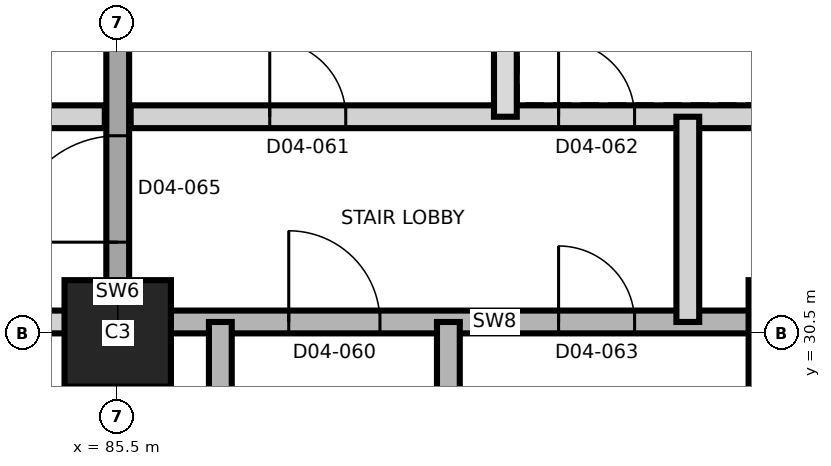
"""IFC4 building model, lengths in metres.
Left out: names, types, materials, properties, quantities, classifications, styles, units other than length and angle.
Written with IfcOpenShell. Run it as: python <this file> out.ifc"""

import sys

from ifc_helpers import new_model, si_unit, direction, frame, frame_2d, origin, origin_2d, place, context, subcontext, project, spatial, rectangle, extrude, element, fill, save


model = new_model("IFC4")
c1 = context("Model", 3, precision=1e-05, world=origin(), true_north=direction((0.0, 1.0)))
c2 = subcontext(c1, "Body", "Model", "MODEL_VIEW")
j1 = project(units=[si_unit("LENGTHUNIT", "METRE"), si_unit("PLANEANGLEUNIT", "RADIAN")], contexts=[c1])
p1 = place(None, origin())
s1 = spatial("IfcSite", under=j1, at=p1, CompositionType="ELEMENT")
p2 = place(p1, origin())
s2 = spatial("IfcBuilding", under=s1, at=p2, CompositionType="ELEMENT")
p3 = place(p2, frame((0.0, 0.0, 66.8)))
s3 = spatial("IfcBuildingStorey", under=s2, at=p3, CompositionType="ELEMENT", Elevation=66.8)
for number, where, z_axis, x_axis in (
    (1, (85.5, 30.5, 0.0), (0.0, 0.0, 1.0), (1.0, 0.0, 0.0)),
    (2, (94.5, 30.5, 0.0), (0.0, 0.0, 1.0), (1.0, 0.0, 0.0)),
):
    element("IfcColumn", number, at=place(p3, frame(where, z_axis=z_axis, x_axis=x_axis)), inside=s3, PredefinedType="COLUMN", context=c2, shape_type="SweptSolid", body=[
        extrude(rectangle(XDim=1.4, YDim=1.4, at=origin_2d()), origin(), (0.0, 0.0, 1.0), 3.7),
    ])
p4 = place(p3, frame((85.5, 19.17, 0.0), z_axis=(0.0, 0.0, 1.0), x_axis=(0.0, 1.0, 0.0)))
e3 = element("IfcWall", 3, at=p4, inside=s3, PredefinedType="SHEAR", context=c2, shape_type="SweptSolid", body=[
    extrude(rectangle(XDim=22.66, YDim=0.3, at=frame_2d((11.33, 0.0))), origin(), (0.0, 0.0, 1.0), 3.7),
])
p5 = place(p4, frame((12.53, 0.0, 0.0)))
e4 = element("IfcOpeningElement", 4, at=p5, cuts=e3, PredefinedType="OPENING", context=c2, shape_type="SweptSolid", body=[
    extrude(rectangle(XDim=1.4, YDim=2.1, at=frame_2d((0.7, 1.05))), frame((0.0, 0.16, 0.0), z_axis=(0.0, -1.0, 0.0), x_axis=(1.0, 0.0, 0.0)), (0.0, 0.0, 1.0), 0.32),
])
p6 = place(p3, frame((58.95, 30.65, 0.0), z_axis=(0.0, 0.0, 1.0), x_axis=(1.0, 0.0, 0.0)))
e5 = element("IfcWall", 5, at=p6, inside=s3, PredefinedType="PARTITIONING", context=c2, shape_type="SweptSolid", body=[
    extrude(rectangle(XDim=26.38, YDim=0.3, at=frame_2d((13.19, 0.0))), origin(), (0.0, 0.0, 1.0), 3.4),
])
p7 = place(p6, frame((1.25, 0.0, 0.0)))
e6 = element("IfcOpeningElement", 6, at=p7, cuts=e5, PredefinedType="OPENING", context=c2, shape_type="SweptSolid", body=[
    extrude(rectangle(XDim=1.2, YDim=2.1, at=frame_2d((0.6, 1.05))), frame((0.0, 0.16, 0.0), z_axis=(0.0, -1.0, 0.0), x_axis=(1.0, 0.0, 0.0)), (0.0, 0.0, 1.0), 0.32),
])
p8 = place(p6, frame((4.5, 0.0, 0.0)))
e7 = element("IfcOpeningElement", 7, at=p8, cuts=e5, PredefinedType="OPENING", context=c2, shape_type="SweptSolid", body=[
    extrude(rectangle(XDim=1.0, YDim=2.1, at=frame_2d((0.5, 1.05))), frame((0.0, 0.16, 0.0), z_axis=(0.0, -1.0, 0.0), x_axis=(1.0, 0.0, 0.0)), (0.0, 0.0, 1.0), 0.32),
])
p9 = place(p6, frame((14.2, 0.0, 0.0)))
e8 = element("IfcOpeningElement", 8, at=p9, cuts=e5, PredefinedType="OPENING", context=c2, shape_type="SweptSolid", body=[
    extrude(rectangle(XDim=1.0, YDim=2.4, at=frame_2d((0.5, 1.2))), frame((0.0, 0.16, 0.0), z_axis=(0.0, -1.0, 0.0), x_axis=(1.0, 0.0, 0.0)), (0.0, 0.0, 1.0), 0.32),
])
p10 = place(p6, frame((18.685, 0.0, 0.0)))
e9 = element("IfcOpeningElement", 9, at=p10, cuts=e5, PredefinedType="OPENING", context=c2, shape_type="SweptSolid", body=[
    extrude(rectangle(XDim=1.2, YDim=2.1, at=frame_2d((0.6, 1.05))), frame((0.0, 0.16, 0.0), z_axis=(0.0, -1.0, 0.0), x_axis=(1.0, 0.0, 0.0)), (0.0, 0.0, 1.0), 0.32),
])
p11 = place(p6, frame((21.935, 0.0, 0.0)))
e10 = element("IfcOpeningElement", 10, at=p11, cuts=e5, PredefinedType="OPENING", context=c2, shape_type="SweptSolid", body=[
    extrude(rectangle(XDim=1.0, YDim=2.1, at=frame_2d((0.5, 1.05))), frame((0.0, 0.16, 0.0), z_axis=(0.0, -1.0, 0.0), x_axis=(1.0, 0.0, 0.0)), (0.0, 0.0, 1.0), 0.32),
])
p12 = place(p3, frame((85.67, 30.65, 0.0), z_axis=(0.0, 0.0, 1.0), x_axis=(1.0, 0.0, 0.0)))
e11 = element("IfcWall", 11, at=p12, inside=s3, PredefinedType="SHEAR", context=c2, shape_type="SweptSolid", body=[
    extrude(rectangle(XDim=9.58, YDim=0.3, at=frame_2d((4.79, 0.0))), origin(), (0.0, 0.0, 1.0), 3.4),
])
p13 = place(p12, frame((2.08, 0.0, 0.0)))
e12 = element("IfcOpeningElement", 12, at=p13, cuts=e11, PredefinedType="OPENING", context=c2, shape_type="SweptSolid", body=[
    extrude(rectangle(XDim=1.2, YDim=2.1, at=frame_2d((0.6, 1.05))), frame((0.0, 0.16, 0.0), z_axis=(0.0, -1.0, 0.0), x_axis=(1.0, 0.0, 0.0)), (0.0, 0.0, 1.0), 0.32),
])
p14 = place(p12, frame((5.63, 0.0, 0.0)))
e13 = element("IfcOpeningElement", 13, at=p14, cuts=e11, PredefinedType="OPENING", context=c2, shape_type="SweptSolid", body=[
    extrude(rectangle(XDim=1.0, YDim=2.1, at=frame_2d((0.5, 1.05))), frame((0.0, 0.16, 0.0), z_axis=(0.0, -1.0, 0.0), x_axis=(1.0, 0.0, 0.0)), (0.0, 0.0, 1.0), 0.32),
])
p15 = place(p3, frame((58.95, 33.35, 0.0), z_axis=(0.0, 0.0, 1.0), x_axis=(1.0, 0.0, 0.0)))
e14 = element("IfcWall", 14, at=p15, inside=s3, PredefinedType="PARTITIONING", context=c2, shape_type="SweptSolid", body=[
    extrude(rectangle(XDim=26.38, YDim=0.3, at=frame_2d((13.19, 0.0))), origin(), (0.0, 0.0, 1.0), 3.4),
])
p16 = place(p15, frame((1.9, 0.0, 0.0)))
e15 = element("IfcOpeningElement", 15, at=p16, cuts=e14, PredefinedType="OPENING", context=c2, shape_type="SweptSolid", body=[
    extrude(rectangle(XDim=1.0, YDim=2.4, at=frame_2d((0.5, 1.2))), frame((0.0, 0.16, 0.0), z_axis=(0.0, -1.0, 0.0), x_axis=(1.0, 0.0, 0.0)), (0.0, 0.0, 1.0), 0.32),
])
p17 = place(p15, frame((9.685, 0.0, 0.0)))
e16 = element("IfcOpeningElement", 16, at=p17, cuts=e14, PredefinedType="OPENING", context=c2, shape_type="SweptSolid", body=[
    extrude(rectangle(XDim=1.2, YDim=2.1, at=frame_2d((0.6, 1.05))), frame((0.0, 0.16, 0.0), z_axis=(0.0, -1.0, 0.0), x_axis=(1.0, 0.0, 0.0)), (0.0, 0.0, 1.0), 0.32),
])
p18 = place(p15, frame((12.935, 0.0, 0.0)))
e17 = element("IfcOpeningElement", 17, at=p18, cuts=e14, PredefinedType="OPENING", context=c2, shape_type="SweptSolid", body=[
    extrude(rectangle(XDim=1.0, YDim=2.1, at=frame_2d((0.5, 1.05))), frame((0.0, 0.16, 0.0), z_axis=(0.0, -1.0, 0.0), x_axis=(1.0, 0.0, 0.0)), (0.0, 0.0, 1.0), 0.32),
])
p19 = place(p15, frame((18.7, 0.0, 0.0)))
e18 = element("IfcOpeningElement", 18, at=p19, cuts=e14, PredefinedType="OPENING", context=c2, shape_type="SweptSolid", body=[
    extrude(rectangle(XDim=1.0, YDim=2.1, at=frame_2d((0.5, 1.05))), frame((0.0, 0.16, 0.0), z_axis=(0.0, -1.0, 0.0), x_axis=(1.0, 0.0, 0.0)), (0.0, 0.0, 1.0), 0.32),
])
p20 = place(p15, frame((24.55, 0.0, 0.0)))
e19 = element("IfcOpeningElement", 19, at=p20, cuts=e14, PredefinedType="OPENING", context=c2, shape_type="SweptSolid", body=[
    extrude(rectangle(XDim=1.0, YDim=2.1, at=frame_2d((0.5, 1.05))), frame((0.0, 0.16, 0.0), z_axis=(0.0, -1.0, 0.0), x_axis=(1.0, 0.0, 0.0)), (0.0, 0.0, 1.0), 0.32),
])
p21 = place(p3, frame((85.67, 33.35, 0.0), z_axis=(0.0, 0.0, 1.0), x_axis=(1.0, 0.0, 0.0)))
e20 = element("IfcWall", 20, at=p21, inside=s3, PredefinedType="PARTITIONING", context=c2, shape_type="SweptSolid", body=[
    extrude(rectangle(XDim=9.58, YDim=0.3, at=frame_2d((4.79, 0.0))), origin(), (0.0, 0.0, 1.0), 3.4),
])
p22 = place(p21, frame((1.83, 0.0, 0.0)))
e21 = element("IfcOpeningElement", 21, at=p22, cuts=e20, PredefinedType="OPENING", context=c2, shape_type="SweptSolid", body=[
    extrude(rectangle(XDim=1.0, YDim=2.1, at=frame_2d((0.5, 1.05))), frame((0.0, 0.16, 0.0), z_axis=(0.0, -1.0, 0.0), x_axis=(1.0, 0.0, 0.0)), (0.0, 0.0, 1.0), 0.32),
])
p23 = place(p21, frame((5.63, 0.0, 0.0)))
e22 = element("IfcOpeningElement", 22, at=p23, cuts=e20, PredefinedType="OPENING", context=c2, shape_type="SweptSolid", body=[
    extrude(rectangle(XDim=1.0, YDim=2.1, at=frame_2d((0.5, 1.05))), frame((0.0, 0.16, 0.0), z_axis=(0.0, -1.0, 0.0), x_axis=(1.0, 0.0, 0.0)), (0.0, 0.0, 1.0), 0.32),
])
for number, where, z_axis, x_axis in (
    (23, (86.85, 21.8, 0.0), (0.0, 0.0, 1.0), (0.0, 1.0, 0.0)),
    (24, (89.85, 21.8, 0.0), (0.0, 0.0, 1.0), (0.0, 1.0, 0.0)),
):
    element("IfcWall", number, at=place(p3, frame(where, z_axis=z_axis, x_axis=x_axis)), inside=s3, PredefinedType="SHEAR", context=c2, shape_type="SweptSolid", body=[
        extrude(rectangle(XDim=8.85, YDim=0.3, at=frame_2d((4.425, 0.0))), origin(), (0.0, 0.0, 1.0), 3.4),
    ])
p24 = place(p3, frame((90.6, 33.35, 0.0), z_axis=(0.0, 0.0, 1.0), x_axis=(0.0, 1.0, 0.0)))
e25 = element("IfcWall", 25, at=p24, inside=s3, PredefinedType="PARTITIONING", context=c2, shape_type="SweptSolid", body=[
    extrude(rectangle(XDim=7.5, YDim=0.3, at=frame_2d((3.75, 0.0))), origin(), (0.0, 0.0, 1.0), 3.35),
])
p25 = place(p3, frame((93.0, 30.65, 0.0), z_axis=(0.0, 0.0, 1.0), x_axis=(0.0, 1.0, 0.0)))
e26 = element("IfcWall", 26, at=p25, inside=s3, PredefinedType="PARTITIONING", context=c2, shape_type="SweptSolid", body=[
    extrude(rectangle(XDim=2.7, YDim=0.3, at=frame_2d((1.35, 0.0))), origin(), (0.0, 0.0, 1.0), 3.4),
])
p26 = place(p13, origin())
e27 = element("IfcDoor", 27, at=p26, inside=s3, OperationType="SINGLE_SWING_LEFT", PredefinedType="DOOR", context=c2, shape_type="SweptSolid", body=[
    extrude(rectangle(XDim=1.2, YDim=2.1, at=frame_2d((0.6, 1.05))), frame((0.0, 0.025, 0.0), z_axis=(0.0, -1.0, 0.0), x_axis=(1.0, 0.0, 0.0)), (0.0, 0.0, 1.0), 0.05),
])
fill(e12, e27)
p27 = place(p22, origin())
e28 = element("IfcDoor", 28, at=p27, inside=s3, OperationType="SINGLE_SWING_LEFT", PredefinedType="DOOR", context=c2, shape_type="SweptSolid", body=[
    extrude(rectangle(XDim=1.0, YDim=2.1, at=frame_2d((0.5, 1.05))), frame((0.0, 0.025, 0.0), z_axis=(0.0, -1.0, 0.0), x_axis=(1.0, 0.0, 0.0)), (0.0, 0.0, 1.0), 0.05),
])
fill(e21, e28)
p28 = place(p23, origin())
e29 = element("IfcDoor", 29, at=p28, inside=s3, OperationType="SINGLE_SWING_RIGHT", PredefinedType="DOOR", context=c2, shape_type="SweptSolid", body=[
    extrude(rectangle(XDim=1.0, YDim=2.1, at=frame_2d((0.5, 1.05))), frame((0.0, 0.025, 0.0), z_axis=(0.0, -1.0, 0.0), x_axis=(1.0, 0.0, 0.0)), (0.0, 0.0, 1.0), 0.05),
])
fill(e22, e29)
p29 = place(p14, origin())
e30 = element("IfcDoor", 30, at=p29, inside=s3, OperationType="SINGLE_SWING_LEFT", PredefinedType="DOOR", context=c2, shape_type="SweptSolid", body=[
    extrude(rectangle(XDim=1.0, YDim=2.1, at=frame_2d((0.5, 1.05))), frame((0.0, 0.025, 0.0), z_axis=(0.0, -1.0, 0.0), x_axis=(1.0, 0.0, 0.0)), (0.0, 0.0, 1.0), 0.05),
])
fill(e13, e30)
p30 = place(p5, origin())
e31 = element("IfcDoor", 31, at=p30, inside=s3, OperationType="SINGLE_SWING_RIGHT", PredefinedType="DOOR", context=c2, shape_type="SweptSolid", body=[
    extrude(rectangle(XDim=1.4, YDim=2.1, at=frame_2d((0.7, 1.05))), frame((0.0, 0.025, 0.0), z_axis=(0.0, -1.0, 0.0), x_axis=(1.0, 0.0, 0.0)), (0.0, 0.0, 1.0), 0.05),
])
fill(e4, e31)
save(model, sys.argv[1])
